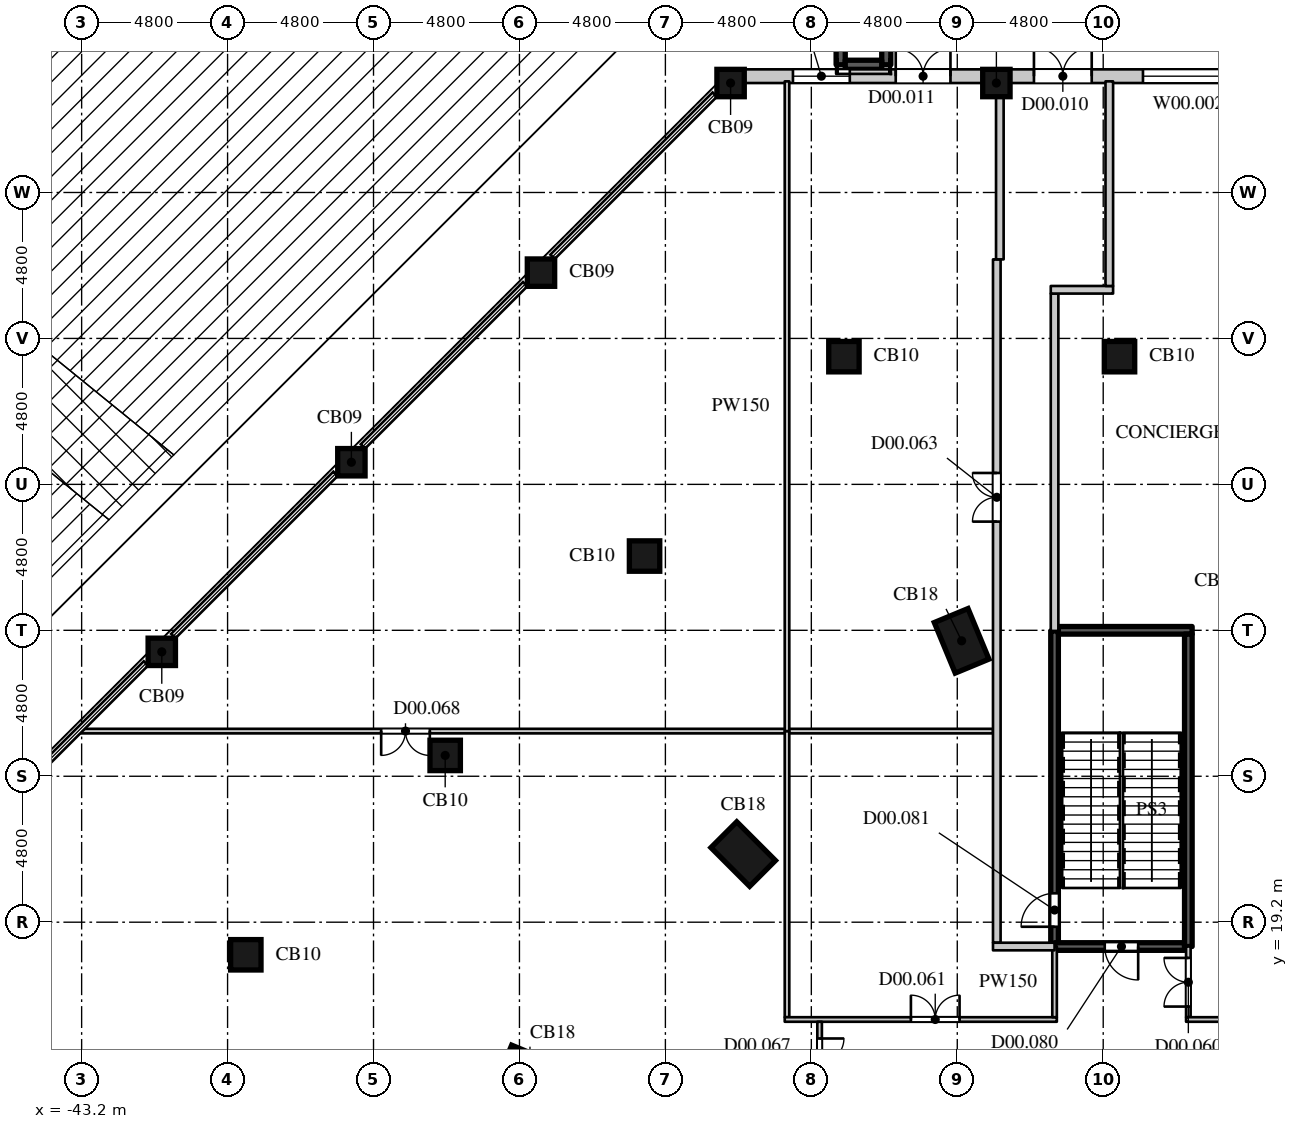
"""IFC4 building model, lengths in metres.
Left out: names, types, materials, properties, quantities, classifications, styles, units other than length and angle.
Written with IfcOpenShell. Run it as: python <this file> out.ifc"""

import sys

from ifc_helpers import new_model, si_unit, direction, frame, frame_2d, origin, origin_2d, place, context, subcontext, project, spatial, rectangle, extrude, element, fill, save


model = new_model("IFC4")
c1 = context("Model", 3, precision=1e-05, world=origin(), true_north=direction((0.0, 1.0)))
c2 = subcontext(c1, "Body", "Model", "MODEL_VIEW")
j1 = project(units=[si_unit("LENGTHUNIT", "METRE"), si_unit("PLANEANGLEUNIT", "RADIAN")], contexts=[c1])
p1 = place(None, origin())
s1 = spatial("IfcSite", under=j1, at=p1, CompositionType="ELEMENT")
p2 = place(p1, origin())
s2 = spatial("IfcBuilding", under=s1, at=p2, CompositionType="ELEMENT")
p3 = place(p2, origin())
s3 = spatial("IfcBuildingStorey", under=s2, at=p3, CompositionType="ELEMENT", Elevation=0.0)
p4 = place(p3, frame((-28.454, 14.257, 0.0), z_axis=(0.0, 0.0, 1.0), x_axis=(-0.382683496864, -0.923879505795, 0.0)))
e1 = element("IfcColumn", 1, at=p4, inside=s3, PredefinedType="COLUMN", context=c2, shape_type="SweptSolid", body=[
    extrude(rectangle(XDim=1.2, YDim=1.8, at=origin_2d()), origin(), (0.0, 0.0, 1.0), 6.0),
])
p5 = place(p3, frame((-37.8, 18.128, 0.0), z_axis=(0.0, 0.0, 1.0), x_axis=(1.0, 0.0, 0.0)))
e2 = element("IfcColumn", 2, at=p5, inside=s3, PredefinedType="COLUMN", context=c2, shape_type="SweptSolid", body=[
    extrude(rectangle(XDim=1.0, YDim=1.0, at=origin_2d()), origin(), (0.0, 0.0, 1.0), 6.0),
])
p6 = place(p3, frame((-21.441, 21.441, 0.0), z_axis=(0.0, 0.0, 1.0), x_axis=(-0.707106781187, -0.707106781187, 0.0)))
e3 = element("IfcColumn", 3, at=p6, inside=s3, PredefinedType="COLUMN", context=c2, shape_type="SweptSolid", body=[
    extrude(rectangle(XDim=1.2, YDim=1.8, at=origin_2d()), origin(), (0.0, 0.0, 1.0), 6.0),
])
p7 = place(p3, frame((-31.243, 24.685, 0.0), z_axis=(0.0, 0.0, 1.0), x_axis=(1.0, 0.0, 0.0)))
e4 = element("IfcColumn", 4, at=p7, inside=s3, PredefinedType="COLUMN", context=c2, shape_type="SweptSolid", body=[
    extrude(rectangle(XDim=1.0, YDim=1.0, at=origin_2d()), origin(), (0.0, 0.0, 1.0), 6.0),
])
p8 = place(p3, frame((-40.564, 28.092, 0.0), z_axis=(0.0, 0.0, 1.0), x_axis=(1.0, 0.0, 0.0)))
e5 = element("IfcColumn", 5, at=p8, inside=s3, PredefinedType="COLUMN", context=c2, shape_type="SweptSolid", body=[
    extrude(rectangle(XDim=0.9, YDim=0.9, at=origin_2d()), origin(), (0.0, 0.0, 1.0), 6.0),
])
p9 = place(p3, frame((-14.257, 28.454, 0.0), z_axis=(0.0, 0.0, 1.0), x_axis=(-0.923879505795, -0.382683496864, 0.0)))
e6 = element("IfcColumn", 6, at=p9, inside=s3, PredefinedType="COLUMN", context=c2, shape_type="SweptSolid", body=[
    extrude(rectangle(XDim=1.2, YDim=1.8, at=origin_2d()), origin(), (0.0, 0.0, 1.0), 6.0),
])
p10 = place(p3, frame((-24.685, 31.243, 0.0), z_axis=(0.0, 0.0, 1.0), x_axis=(1.0, 0.0, 0.0)))
e7 = element("IfcColumn", 7, at=p10, inside=s3, PredefinedType="COLUMN", context=c2, shape_type="SweptSolid", body=[
    extrude(rectangle(XDim=1.0, YDim=1.0, at=origin_2d()), origin(), (0.0, 0.0, 1.0), 6.0),
])
p11 = place(p3, frame((-34.328, 34.328, 0.0), z_axis=(0.0, 0.0, 1.0), x_axis=(1.0, 0.0, 0.0)))
e8 = element("IfcColumn", 8, at=p11, inside=s3, PredefinedType="COLUMN", context=c2, shape_type="SweptSolid", body=[
    extrude(rectangle(XDim=0.9, YDim=0.9, at=origin_2d()), origin(), (0.0, 0.0, 1.0), 6.0),
])
for number, where, z_axis, x_axis in (
    (9, (-18.128, 37.8, 0.0), (0.0, 0.0, 1.0), (1.0, 0.0, 0.0)),
    (10, (-9.064, 37.8, 0.0), (0.0, 0.0, 1.0), (1.0, 0.0, 0.0)),
):
    element("IfcColumn", number, at=place(p3, frame(where, z_axis=z_axis, x_axis=x_axis)), inside=s3, PredefinedType="COLUMN", context=c2, shape_type="SweptSolid", body=[
        extrude(rectangle(XDim=1.0, YDim=1.0, at=origin_2d()), origin(), (0.0, 0.0, 1.0), 6.0),
    ])
for number, where, z_axis, x_axis in (
    (11, (-28.092, 40.564, 0.0), (0.0, 0.0, 1.0), (1.0, 0.0, 0.0)),
    (12, (-21.856, 46.8, 0.0), (0.0, 0.0, 1.0), (1.0, 0.0, 0.0)),
    (13, (-13.114, 46.8, 0.0), (0.0, 0.0, 1.0), (1.0, 0.0, 0.0)),
):
    element("IfcColumn", number, at=place(p3, frame(where, z_axis=z_axis, x_axis=x_axis)), inside=s3, PredefinedType="COLUMN", context=c2, shape_type="SweptSolid", body=[
        extrude(rectangle(XDim=0.9, YDim=0.9, at=origin_2d()), origin(), (0.0, 0.0, 1.0), 6.0),
    ])
p12 = place(p3, frame((-4.821, 47.025, 0.0), z_axis=(0.0, 0.0, 1.0), x_axis=(-1.0, 0.0, 0.0)))
e14 = element("IfcWall", 14, at=p12, inside=s3, PredefinedType="ELEMENTEDWALL", context=c2, shape_type="SweptSolid", body=[
    extrude(rectangle(XDim=7.842, YDim=0.45, at=frame_2d((3.921, 0.0))), origin(), (0.0, 0.0, 1.0), 4.8),
])
p13 = place(p12, frame((0.471, 0.0, 1.05)))
e15 = element("IfcOpeningElement", 15, at=p13, cuts=e14, PredefinedType="OPENING", context=c2, shape_type="SweptSolid", body=[
    extrude(rectangle(XDim=3.0, YDim=2.7, at=frame_2d((1.5, 1.35))), frame((0.0, 0.235, 0.0), z_axis=(0.0, -1.0, 0.0), x_axis=(1.0, 0.0, 0.0)), (0.0, 0.0, 1.0), 0.47),
])
p14 = place(p12, frame((5.157, 0.0, 0.0)))
e16 = element("IfcOpeningElement", 16, at=p14, cuts=e14, PredefinedType="OPENING", context=c2, shape_type="SweptSolid", body=[
    extrude(rectangle(XDim=1.9, YDim=2.7, at=frame_2d((0.95, 1.35))), frame((0.0, 0.235, 0.0), z_axis=(0.0, -1.0, 0.0), x_axis=(1.0, 0.0, 0.0)), (0.0, 0.0, 1.0), 0.47),
])
p15 = place(p3, frame((-13.563, 47.025, 0.0), z_axis=(0.0, 0.0, 1.0), x_axis=(-1.0, 0.0, 0.0)))
e17 = element("IfcWall", 17, at=p15, inside=s3, PredefinedType="ELEMENTEDWALL", context=c2, shape_type="SweptSolid", body=[
    extrude(rectangle(XDim=7.842, YDim=0.45, at=frame_2d((3.921, 0.0))), origin(), (0.0, 0.0, 1.0), 4.8),
])
p16 = place(p15, frame((1.061, 0.0, 0.0)))
e18 = element("IfcOpeningElement", 18, at=p16, cuts=e17, PredefinedType="OPENING", context=c2, shape_type="SweptSolid", body=[
    extrude(rectangle(XDim=1.8, YDim=2.7, at=frame_2d((0.9, 1.35))), frame((0.0, 0.235, 0.0), z_axis=(0.0, -1.0, 0.0), x_axis=(1.0, 0.0, 0.0)), (0.0, 0.0, 1.0), 0.47),
])
p17 = place(p15, frame((4.371, 0.0, 1.05)))
e19 = element("IfcOpeningElement", 19, at=p17, cuts=e17, PredefinedType="OPENING", context=c2, shape_type="SweptSolid", body=[
    extrude(rectangle(XDim=1.87, YDim=2.7, at=frame_2d((0.935, 1.35))), frame((0.0, 0.235, 0.0), z_axis=(0.0, -1.0, 0.0), x_axis=(1.0, 0.0, 0.0)), (0.0, 0.0, 1.0), 0.47),
])
p18 = place(p3, frame((-43.248, 25.485, 0.0), z_axis=(0.0, 0.0, 1.0), x_axis=(1.0, 0.0, 0.0)))
e20 = element("IfcWall", 20, at=p18, inside=s3, PredefinedType="PARTITIONING", context=c2, shape_type="SweptSolid", body=[
    extrude(rectangle(XDim=30.023, YDim=0.15, at=frame_2d((15.012, 0.0))), origin(), (0.0, 0.0, 1.0), 5.65),
])
p19 = place(p18, frame((9.9, 0.0, 0.0)))
e21 = element("IfcOpeningElement", 21, at=p19, cuts=e20, PredefinedType="OPENING", context=c2, shape_type="SweptSolid", body=[
    extrude(rectangle(XDim=1.6, YDim=2.4, at=frame_2d((0.8, 1.2))), frame((0.0, 0.085, 0.0), z_axis=(0.0, -1.0, 0.0), x_axis=(1.0, 0.0, 0.0)), (0.0, 0.0, 1.0), 0.17),
])
p20 = place(p3, frame((-20.0, 16.075, 0.0), z_axis=(0.0, 0.0, 1.0), x_axis=(0.0, 1.0, 0.0)))
e22 = element("IfcWall", 22, at=p20, inside=s3, PredefinedType="PARTITIONING", context=c2, shape_type="SweptSolid", body=[
    extrude(rectangle(XDim=9.41, YDim=0.15, at=frame_2d((4.705, 0.0))), origin(), (0.0, 0.0, 1.0), 5.65),
])
p21 = place(p3, frame((-20.075, 16.0, 0.0), z_axis=(0.0, 0.0, 1.0), x_axis=(1.0, 0.0, 0.0)))
e23 = element("IfcWall", 23, at=p21, inside=s3, PredefinedType="PARTITIONING", context=c2, shape_type="SweptSolid", body=[
    extrude(rectangle(XDim=8.95, YDim=0.15, at=frame_2d((4.475, 0.0))), origin(), (0.0, 0.0, 1.0), 5.65),
])
p22 = place(p21, frame((4.15, 0.0, 0.0)))
e24 = element("IfcOpeningElement", 24, at=p22, cuts=e23, PredefinedType="OPENING", context=c2, shape_type="SweptSolid", body=[
    extrude(rectangle(XDim=1.6, YDim=2.4, at=frame_2d((0.8, 1.2))), frame((0.0, 0.085, 0.0), z_axis=(0.0, -1.0, 0.0), x_axis=(1.0, 0.0, 0.0)), (0.0, 0.0, 1.0), 0.17),
])
p23 = place(p3, frame((-20.0, 25.485, 0.0), z_axis=(0.0, 0.0, 1.0), x_axis=(0.0, 1.0, 0.0)))
e25 = element("IfcWall", 25, at=p23, inside=s3, PredefinedType="PARTITIONING", context=c2, shape_type="SweptSolid", body=[
    extrude(rectangle(XDim=21.37, YDim=0.15, at=frame_2d((10.685, 0.0))), origin(), (0.0, 0.0, 1.0), 5.65),
])
p24 = place(p3, frame((-18.928, 13.225, 0.0), z_axis=(0.0, 0.0, 1.0), x_axis=(0.0, 1.0, 0.0)))
e26 = element("IfcWall", 26, at=p24, inside=s3, PredefinedType="PARTITIONING", context=c2, shape_type="SweptSolid", body=[
    extrude(rectangle(XDim=2.7, YDim=0.15, at=frame_2d((1.35, 0.0))), origin(), (0.0, 0.0, 1.0), 5.65),
])
p25 = place(p24, frame((0.55, 0.0, 0.0)))
e27 = element("IfcOpeningElement", 27, at=p25, cuts=e26, PredefinedType="OPENING", context=c2, shape_type="SweptSolid", body=[
    extrude(rectangle(XDim=1.6, YDim=2.4, at=frame_2d((0.8, 1.2))), frame((0.0, 0.085, 0.0), z_axis=(0.0, -1.0, 0.0), x_axis=(1.0, 0.0, 0.0)), (0.0, 0.0, 1.0), 0.17),
])
p26 = place(p3, frame((-11.2, 16.075, 0.0), z_axis=(0.0, 0.0, 1.0), x_axis=(0.0, 1.0, 0.0)))
e28 = element("IfcWall", 28, at=p26, inside=s3, PredefinedType="PARTITIONING", context=c2, shape_type="SweptSolid", body=[
    extrude(rectangle(XDim=2.325, YDim=0.15, at=frame_2d((1.163, 0.0))), origin(), (0.0, 0.0, 1.0), 5.65),
])
p27 = place(p3, frame((-6.8, 16.075, 0.0), z_axis=(0.0, 0.0, 1.0), x_axis=(0.0, 1.0, 0.0)))
e29 = element("IfcWall", 29, at=p27, inside=s3, PredefinedType="PARTITIONING", context=c2, shape_type="SweptSolid", body=[
    extrude(rectangle(XDim=2.325, YDim=0.15, at=frame_2d((1.163, 0.0))), origin(), (0.0, 0.0, 1.0), 5.65),
])
p28 = place(p27, frame((0.35, 0.0, 0.0)))
e30 = element("IfcOpeningElement", 30, at=p28, cuts=e29, PredefinedType="OPENING", context=c2, shape_type="SweptSolid", body=[
    extrude(rectangle(XDim=1.6, YDim=2.4, at=frame_2d((0.8, 1.2))), frame((0.0, 0.085, 0.0), z_axis=(0.0, -1.0, 0.0), x_axis=(1.0, 0.0, 0.0)), (0.0, 0.0, 1.0), 0.17),
])
p29 = place(p3, frame((-6.875, 16.0, 0.0), z_axis=(0.0, 0.0, 1.0), x_axis=(1.0, 0.0, 0.0)))
e31 = element("IfcWall", 31, at=p29, inside=s3, PredefinedType="PARTITIONING", context=c2, shape_type="SweptSolid", body=[
    extrude(rectangle(XDim=3.275, YDim=0.15, at=frame_2d((1.637, 0.0))), origin(), (0.0, 0.0, 1.0), 5.65),
])
p30 = place(p3, frame((-11.2, 18.4, 0.0), z_axis=(0.0, 0.0, 1.0), x_axis=(0.0, 1.0, 0.0)))
e32 = element("IfcWall", 32, at=p30, inside=s3, PredefinedType="SHEAR", context=c2, shape_type="SweptSolid", body=[
    extrude(rectangle(XDim=10.38, YDim=0.25, at=frame_2d((5.19, 0.0))), origin(), (0.0, 0.0, 1.0), 5.65),
])
p31 = place(p30, frame((0.65, 0.0, 0.0)))
e33 = element("IfcOpeningElement", 33, at=p31, cuts=e32, PredefinedType="OPENING", context=c2, shape_type="SweptSolid", body=[
    extrude(rectangle(XDim=1.1, YDim=2.2, at=frame_2d((0.55, 1.1))), frame((0.0, 0.135, 0.0), z_axis=(0.0, -1.0, 0.0), x_axis=(1.0, 0.0, 0.0)), (0.0, 0.0, 1.0), 0.27),
])
p32 = place(p3, frame((-11.2, 18.4, 0.0), z_axis=(0.0, 0.0, 1.0), x_axis=(1.0, 0.0, 0.0)))
e34 = element("IfcWall", 34, at=p32, inside=s3, PredefinedType="SHEAR", context=c2, shape_type="SweptSolid", body=[
    extrude(rectangle(XDim=4.275, YDim=0.25, at=frame_2d((2.137, 0.0))), origin(), (0.0, 0.0, 1.0), 5.65),
])
p33 = place(p32, frame((1.65, 0.0, 0.0)))
e35 = element("IfcOpeningElement", 35, at=p33, cuts=e34, PredefinedType="OPENING", context=c2, shape_type="SweptSolid", body=[
    extrude(rectangle(XDim=1.1, YDim=2.2, at=frame_2d((0.55, 1.1))), frame((0.0, 0.135, 0.0), z_axis=(0.0, -1.0, 0.0), x_axis=(1.0, 0.0, 0.0)), (0.0, 0.0, 1.0), 0.27),
])
p34 = place(p3, frame((-11.075, 28.8, 0.0), z_axis=(0.0, 0.0, 1.0), x_axis=(1.0, 0.0, 0.0)))
e36 = element("IfcWall", 36, at=p34, inside=s3, PredefinedType="SHEAR", context=c2, shape_type="SweptSolid", body=[
    extrude(rectangle(XDim=4.4, YDim=0.25, at=frame_2d((2.2, 0.0))), origin(), (0.0, 0.0, 1.0), 5.65),
])
p35 = place(p3, frame((-6.8, 18.4, 0.0), z_axis=(0.0, 0.0, 1.0), x_axis=(0.0, 1.0, 0.0)))
e37 = element("IfcWall", 37, at=p35, inside=s3, PredefinedType="SHEAR", context=c2, shape_type="SweptSolid", body=[
    extrude(rectangle(XDim=10.275, YDim=0.25, at=frame_2d((5.138, 0.0))), origin(), (0.0, 0.0, 1.0), 5.65),
])
p36 = place(p3, frame((-13.1, 18.525, 0.0), z_axis=(0.0, 0.0, 1.0), x_axis=(0.0, 1.0, 0.0)))
e38 = element("IfcWall", 38, at=p36, inside=s3, PredefinedType="PARTITIONING", context=c2, shape_type="SweptSolid", body=[
    extrude(rectangle(XDim=22.475, YDim=0.25, at=frame_2d((11.238, 0.0))), origin(), (0.0, 0.0, 1.0), 5.65),
])
p37 = place(p36, frame((13.85, 0.0, 0.0)))
e39 = element("IfcOpeningElement", 39, at=p37, cuts=e38, PredefinedType="OPENING", context=c2, shape_type="SweptSolid", body=[
    extrude(rectangle(XDim=1.6, YDim=2.4, at=frame_2d((0.8, 1.2))), frame((0.0, 0.135, 0.0), z_axis=(0.0, -1.0, 0.0), x_axis=(1.0, 0.0, 0.0)), (0.0, 0.0, 1.0), 0.27),
])
p38 = place(p3, frame((-13.225, 18.4, 0.0), z_axis=(0.0, 0.0, 1.0), x_axis=(1.0, 0.0, 0.0)))
e40 = element("IfcWall", 40, at=p38, inside=s3, PredefinedType="PARTITIONING", context=c2, shape_type="SweptSolid", body=[
    extrude(rectangle(XDim=2.025, YDim=0.25, at=frame_2d((1.013, 0.0))), origin(), (0.0, 0.0, 1.0), 5.65),
])
p39 = place(p3, frame((-13.0, 41.0, 0.0), z_axis=(0.0, 0.0, 1.0), x_axis=(0.0, 1.0, 0.0)))
e41 = element("IfcWall", 41, at=p39, inside=s3, PredefinedType="PARTITIONING", context=c2, shape_type="SweptSolid", body=[
    extrude(rectangle(XDim=5.35, YDim=0.25, at=frame_2d((2.675, 0.0))), origin(), (0.0, 0.0, 1.0), 5.65),
])
p40 = place(p3, frame((-11.2, 28.78, 0.0), z_axis=(0.0, 0.0, 1.0), x_axis=(0.0, 1.0, 0.0)))
e42 = element("IfcWall", 42, at=p40, inside=s3, PredefinedType="PARTITIONING", context=c2, shape_type="SweptSolid", body=[
    extrude(rectangle(XDim=11.095, YDim=0.25, at=frame_2d((5.547, 0.0))), origin(), (0.0, 0.0, 1.0), 5.65),
])
p41 = place(p3, frame((-11.325, 40.0, 0.0), z_axis=(0.0, 0.0, 1.0), x_axis=(1.0, 0.0, 0.0)))
e43 = element("IfcWall", 43, at=p41, inside=s3, PredefinedType="PARTITIONING", context=c2, shape_type="SweptSolid", body=[
    extrude(rectangle(XDim=2.05, YDim=0.25, at=frame_2d((1.025, 0.0))), origin(), (0.0, 0.0, 1.0), 5.65),
])
p42 = place(p3, frame((-9.4, 40.125, 0.0), z_axis=(0.0, 0.0, 1.0), x_axis=(0.0, 1.0, 0.0)))
e44 = element("IfcWall", 44, at=p42, inside=s3, PredefinedType="PARTITIONING", context=c2, shape_type="SweptSolid", body=[
    extrude(rectangle(XDim=6.73, YDim=0.25, at=frame_2d((3.365, 0.0))), origin(), (0.0, 0.0, 1.0), 5.65),
])
for number, where, z_axis, x_axis in (
    (45, (-16.735, 47.4, 0.0), (0.0, 0.0, 1.0), (0.0, 1.0, 0.0)),
    (46, (-18.235, 47.4, 0.0), (0.0, 0.0, 1.0), (0.0, 1.0, 0.0)),
):
    element("IfcWall", number, at=place(p3, frame(where, z_axis=z_axis, x_axis=x_axis)), inside=s3, PredefinedType="SOLIDWALL", context=c2, shape_type="SweptSolid", body=[
        extrude(rectangle(XDim=1.35, YDim=0.3, at=frame_2d((0.675, 0.0))), origin(), (0.0, 0.0, 1.0), 5.8),
    ])
p43 = place(p3, frame((-16.885, 47.4, 0.0), z_axis=(0.0, 0.0, 1.0), x_axis=(-1.0, 0.0, 0.0)))
e47 = element("IfcWall", 47, at=p43, inside=s3, PredefinedType="SOLIDWALL", context=c2, shape_type="SweptSolid", body=[
    extrude(rectangle(XDim=1.2, YDim=0.3, at=frame_2d((0.6, 0.0))), origin(), (0.0, 0.0, 1.0), 5.8),
])
p44 = place(p13, origin())
e48 = element("IfcWindow", 48, at=p44, inside=s3, PartitioningType="SINGLE_PANEL", PredefinedType="WINDOW", context=c2, shape_type="SweptSolid", body=[
    extrude(rectangle(XDim=3.0, YDim=2.7, at=frame_2d((1.5, 1.35))), frame((0.0, 0.135, 0.0), z_axis=(0.0, -1.0, 0.0), x_axis=(1.0, 0.0, 0.0)), (0.0, 0.0, 1.0), 0.06),
])
fill(e15, e48)
p45 = place(p14, frame((1.9, 0.0, 0.0), z_axis=(0.0, 0.0, 1.0), x_axis=(-1.0, 0.0, 0.0)))
e49 = element("IfcDoor", 49, at=p45, inside=s3, OperationType="DOUBLE_DOOR_SINGLE_SWING", PredefinedType="DOOR", context=c2, shape_type="SweptSolid", body=[
    extrude(rectangle(XDim=1.9, YDim=2.7, at=frame_2d((0.95, 1.35))), frame((0.0, -0.08, 0.0), z_axis=(0.0, -1.0, 0.0), x_axis=(1.0, 0.0, 0.0)), (0.0, 0.0, 1.0), 0.05),
])
fill(e16, e49)
p46 = place(p16, frame((1.8, 0.0, 0.0), z_axis=(0.0, 0.0, 1.0), x_axis=(-1.0, 0.0, 0.0)))
e50 = element("IfcDoor", 50, at=p46, inside=s3, OperationType="DOUBLE_DOOR_SINGLE_SWING", PredefinedType="DOOR", context=c2, shape_type="SweptSolid", body=[
    extrude(rectangle(XDim=1.8, YDim=2.7, at=frame_2d((0.9, 1.35))), frame((0.0, -0.08, 0.0), z_axis=(0.0, -1.0, 0.0), x_axis=(1.0, 0.0, 0.0)), (0.0, 0.0, 1.0), 0.05),
])
fill(e18, e50)
p47 = place(p17, origin())
e51 = element("IfcWindow", 51, at=p47, inside=s3, PartitioningType="SINGLE_PANEL", PredefinedType="WINDOW", context=c2, shape_type="SweptSolid", body=[
    extrude(rectangle(XDim=1.87, YDim=2.7, at=frame_2d((0.935, 1.35))), frame((0.0, 0.135, 0.0), z_axis=(0.0, -1.0, 0.0), x_axis=(1.0, 0.0, 0.0)), (0.0, 0.0, 1.0), 0.06),
])
fill(e19, e51)
p48 = place(p28, origin())
e52 = element("IfcDoor", 52, at=p48, inside=s3, OperationType="DOUBLE_DOOR_SINGLE_SWING", PredefinedType="DOOR", context=c2, shape_type="SweptSolid", body=[
    extrude(rectangle(XDim=1.6, YDim=2.4, at=frame_2d((0.8, 1.2))), frame((0.0, 0.025, 0.0), z_axis=(0.0, -1.0, 0.0), x_axis=(1.0, 0.0, 0.0)), (0.0, 0.0, 1.0), 0.05),
])
fill(e30, e52)
p49 = place(p22, origin())
e53 = element("IfcDoor", 53, at=p49, inside=s3, OperationType="DOUBLE_DOOR_SINGLE_SWING", PredefinedType="DOOR", context=c2, shape_type="SweptSolid", body=[
    extrude(rectangle(XDim=1.6, YDim=2.4, at=frame_2d((0.8, 1.2))), frame((0.0, 0.025, 0.0), z_axis=(0.0, -1.0, 0.0), x_axis=(1.0, 0.0, 0.0)), (0.0, 0.0, 1.0), 0.05),
])
fill(e24, e53)
p50 = place(p37, origin())
e54 = element("IfcDoor", 54, at=p50, inside=s3, OperationType="DOUBLE_DOOR_SINGLE_SWING", PredefinedType="DOOR", context=c2, shape_type="SweptSolid", body=[
    extrude(rectangle(XDim=1.6, YDim=2.4, at=frame_2d((0.8, 1.2))), frame((0.0, 0.025, 0.0), z_axis=(0.0, -1.0, 0.0), x_axis=(1.0, 0.0, 0.0)), (0.0, 0.0, 1.0), 0.05),
])
fill(e39, e54)
p51 = place(p25, origin())
e55 = element("IfcDoor", 55, at=p51, inside=s3, OperationType="DOUBLE_DOOR_SINGLE_SWING", PredefinedType="DOOR", context=c2, shape_type="SweptSolid", body=[
    extrude(rectangle(XDim=1.6, YDim=2.4, at=frame_2d((0.8, 1.2))), frame((0.0, 0.025, 0.0), z_axis=(0.0, -1.0, 0.0), x_axis=(1.0, 0.0, 0.0)), (0.0, 0.0, 1.0), 0.05),
])
fill(e27, e55)
p52 = place(p19, origin())
e56 = element("IfcDoor", 56, at=p52, inside=s3, OperationType="DOUBLE_DOOR_SINGLE_SWING", PredefinedType="DOOR", context=c2, shape_type="SweptSolid", body=[
    extrude(rectangle(XDim=1.6, YDim=2.4, at=frame_2d((0.8, 1.2))), frame((0.0, 0.025, 0.0), z_axis=(0.0, -1.0, 0.0), x_axis=(1.0, 0.0, 0.0)), (0.0, 0.0, 1.0), 0.05),
])
fill(e21, e56)
p53 = place(p33, origin())
e57 = element("IfcDoor", 57, at=p53, inside=s3, OperationType="SINGLE_SWING_LEFT", PredefinedType="DOOR", context=c2, shape_type="SweptSolid", body=[
    extrude(rectangle(XDim=1.1, YDim=2.2, at=frame_2d((0.55, 1.1))), frame((0.0, 0.025, 0.0), z_axis=(0.0, -1.0, 0.0), x_axis=(1.0, 0.0, 0.0)), (0.0, 0.0, 1.0), 0.05),
])
fill(e35, e57)
p54 = place(p31, origin())
e58 = element("IfcDoor", 58, at=p54, inside=s3, OperationType="SINGLE_SWING_LEFT", PredefinedType="DOOR", context=c2, shape_type="SweptSolid", body=[
    extrude(rectangle(XDim=1.1, YDim=2.2, at=frame_2d((0.55, 1.1))), frame((0.0, 0.025, 0.0), z_axis=(0.0, -1.0, 0.0), x_axis=(1.0, 0.0, 0.0)), (0.0, 0.0, 1.0), 0.05),
])
fill(e33, e58)
save(model, sys.argv[1])
